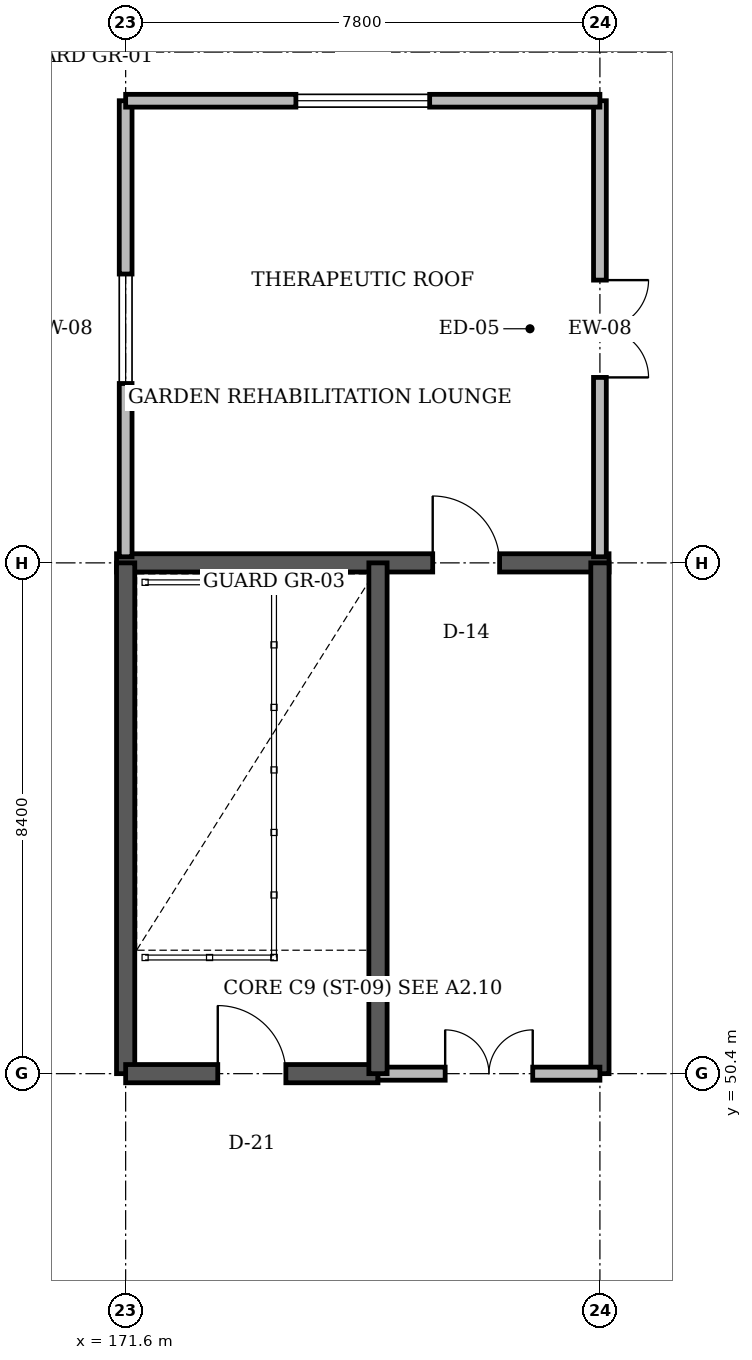
"""IFC4 building model, lengths in metres.
Left out: names, types, materials, properties, quantities, classifications, styles, units other than length and angle.
Written with IfcOpenShell. Run it as: python <this file> out.ifc"""

import sys

from ifc_helpers import new_model, si_unit, direction, frame, frame_2d, origin, place, context, subcontext, project, spatial, rectangle, extrude, element, fill, save


model = new_model("IFC4")
c1 = context("Model", 3, precision=1e-05, world=origin(), true_north=direction((0.0, 1.0)))
c2 = subcontext(c1, "Body", "Model", "MODEL_VIEW")
j1 = project(units=[si_unit("LENGTHUNIT", "METRE"), si_unit("PLANEANGLEUNIT", "RADIAN")], contexts=[c1])
p1 = place(None, origin())
s1 = spatial("IfcSite", under=j1, at=p1, CompositionType="ELEMENT")
p2 = place(p1, origin())
s2 = spatial("IfcBuilding", under=s1, at=p2, CompositionType="ELEMENT")
p3 = place(p2, frame((0.0, 0.0, 18.0)))
s3 = spatial("IfcBuildingStorey", under=s2, at=p3, CompositionType="ELEMENT", Elevation=18.0)
p4 = place(p3, frame((171.45, 58.8, 0.0), z_axis=(0.0, 0.0, 1.0), x_axis=(1.0, 0.0, 0.0)))
e1 = element("IfcWall", 1, at=p4, inside=s3, PredefinedType="SHEAR", context=c2, shape_type="SweptSolid", body=[
    extrude(rectangle(XDim=8.1, YDim=0.3, at=frame_2d((4.05, 0.0))), origin(), (0.0, 0.0, 1.0), 4.2),
])
p5 = place(p4, frame((5.2, 0.0, 0.0)))
e2 = element("IfcOpeningElement", 2, at=p5, cuts=e1, PredefinedType="OPENING", context=c2, shape_type="SweptSolid", body=[
    extrude(rectangle(XDim=1.1, YDim=2.15, at=frame_2d((0.55, 1.075))), frame((0.0, 0.16, 0.0), z_axis=(0.0, -1.0, 0.0), x_axis=(1.0, 0.0, 0.0)), (0.0, 0.0, 1.0), 0.32),
])
for number, where, z_axis, x_axis in (
    (3, (171.6, 50.4, 0.0), (0.0, 0.0, 1.0), (0.0, 1.0, 0.0)),
    (4, (179.4, 50.4, 0.0), (0.0, 0.0, 1.0), (0.0, 1.0, 0.0)),
):
    element("IfcWall", number, at=place(p3, frame(where, z_axis=z_axis, x_axis=x_axis)), inside=s3, PredefinedType="SHEAR", context=c2, shape_type="SweptSolid", body=[
        extrude(rectangle(XDim=8.4, YDim=0.3, at=frame_2d((4.2, 0.0))), origin(), (0.0, 0.0, 1.0), 4.2),
    ])
p6 = place(p3, frame((179.4, 66.4, 0.0), z_axis=(0.0, 0.0, 1.0), x_axis=(0.0, -1.0, 0.0)))
e5 = element("IfcWall", 5, at=p6, inside=s3, PredefinedType="STANDARD", context=c2, shape_type="SweptSolid", body=[
    extrude(rectangle(XDim=7.5, YDim=0.21, at=frame_2d((3.75, 0.0))), origin(), (0.0, 0.0, 1.0), 3.94),
])
p7 = place(p6, frame((2.95, 0.0, 0.0)))
e6 = element("IfcOpeningElement", 6, at=p7, cuts=e5, PredefinedType="OPENING", context=c2, shape_type="SweptSolid", body=[
    extrude(rectangle(XDim=1.6, YDim=2.2, at=frame_2d((0.8, 1.1))), frame((0.0, 0.115, 0.0), z_axis=(0.0, -1.0, 0.0), x_axis=(1.0, 0.0, 0.0)), (0.0, 0.0, 1.0), 0.23),
])
p8 = place(p3, frame((171.6, 58.9, 0.0), z_axis=(0.0, 0.0, 1.0), x_axis=(0.0, 1.0, 0.0)))
e7 = element("IfcWall", 7, at=p8, inside=s3, PredefinedType="STANDARD", context=c2, shape_type="SweptSolid", body=[
    extrude(rectangle(XDim=7.5, YDim=0.21, at=frame_2d((3.75, 0.0))), origin(), (0.0, 0.0, 1.0), 3.94),
])
p9 = place(p8, frame((2.85, 0.0, 0.9)))
e8 = element("IfcOpeningElement", 8, at=p9, cuts=e7, PredefinedType="OPENING", context=c2, shape_type="SweptSolid", body=[
    extrude(rectangle(XDim=1.8, YDim=1.65, at=frame_2d((0.9, 0.825))), frame((0.0, 0.115, 0.0), z_axis=(0.0, -1.0, 0.0), x_axis=(1.0, 0.0, 0.0)), (0.0, 0.0, 1.0), 0.23),
])
p10 = place(p3, frame((171.6, 66.4, 0.0), z_axis=(0.0, 0.0, 1.0), x_axis=(1.0, 0.0, 0.0)))
e9 = element("IfcWall", 9, at=p10, inside=s3, PredefinedType="STANDARD", context=c2, shape_type="SweptSolid", body=[
    extrude(rectangle(XDim=7.8, YDim=0.21, at=frame_2d((3.9, 0.0))), origin(), (0.0, 0.0, 1.0), 3.94),
])
p11 = place(p10, frame((2.8, 0.0, 0.9)))
e10 = element("IfcOpeningElement", 10, at=p11, cuts=e9, PredefinedType="OPENING", context=c2, shape_type="SweptSolid", body=[
    extrude(rectangle(XDim=2.2, YDim=1.65, at=frame_2d((1.1, 0.825))), frame((0.0, 0.115, 0.0), z_axis=(0.0, -1.0, 0.0), x_axis=(1.0, 0.0, 0.0)), (0.0, 0.0, 1.0), 0.23),
])
p12 = place(p3, frame((171.6, 50.4, 0.0), z_axis=(0.0, 0.0, 1.0), x_axis=(1.0, 0.0, 0.0)))
e11 = element("IfcWall", 11, at=p12, inside=s3, PredefinedType="SHEAR", context=c2, shape_type="SweptSolid", body=[
    extrude(rectangle(XDim=4.15, YDim=0.3, at=frame_2d((2.075, 0.0))), origin(), (0.0, 0.0, 1.0), 4.2),
])
p13 = place(p12, frame((1.515, 0.0, 0.0)))
e12 = element("IfcOpeningElement", 12, at=p13, cuts=e11, PredefinedType="OPENING", context=c2, shape_type="SweptSolid", body=[
    extrude(rectangle(XDim=1.12, YDim=2.15, at=frame_2d((0.56, 1.075))), frame((0.0, 0.16, 0.0), z_axis=(0.0, -1.0, 0.0), x_axis=(1.0, 0.0, 0.0)), (0.0, 0.0, 1.0), 0.32),
])
p14 = place(p3, frame((175.75, 50.4, 0.0), z_axis=(0.0, 0.0, 1.0), x_axis=(1.0, 0.0, 0.0)))
e13 = element("IfcWall", 13, at=p14, inside=s3, PredefinedType="STANDARD", context=c2, shape_type="SweptSolid", body=[
    extrude(rectangle(XDim=3.65, YDim=0.215, at=frame_2d((1.825, 0.0))), origin(), (0.0, 0.0, 1.0), 3.22),
])
p15 = place(p14, frame((1.105, 0.0, 0.0)))
e14 = element("IfcOpeningElement", 14, at=p15, cuts=e13, PredefinedType="OPENING", context=c2, shape_type="SweptSolid", body=[
    extrude(rectangle(XDim=1.44, YDim=2.2, at=frame_2d((0.72, 1.1))), frame((0.0, 0.118, 0.0), z_axis=(0.0, -1.0, 0.0), x_axis=(1.0, 0.0, 0.0)), (0.0, 0.0, 1.0), 0.235),
])
p16 = place(p3, frame((175.75, 50.4, 0.0), z_axis=(0.0, 0.0, 1.0), x_axis=(0.0, 1.0, 0.0)))
e15 = element("IfcWall", 15, at=p16, inside=s3, PredefinedType="SHEAR", context=c2, shape_type="SweptSolid", body=[
    extrude(rectangle(XDim=8.4, YDim=0.3, at=frame_2d((4.2, 0.0))), origin(), (0.0, 0.0, 1.0), 4.2),
])
p17 = place(p7, origin())
e16 = element("IfcDoor", 16, at=p17, inside=s3, OperationType="DOUBLE_DOOR_SINGLE_SWING", PredefinedType="DOOR", context=c2, shape_type="SweptSolid", body=[
    extrude(rectangle(XDim=1.6, YDim=2.2, at=frame_2d((0.8, 1.1))), frame((0.0, 0.025, 0.0), z_axis=(0.0, -1.0, 0.0), x_axis=(1.0, 0.0, 0.0)), (0.0, 0.0, 1.0), 0.05),
])
fill(e6, e16)
p18 = place(p9, origin())
e17 = element("IfcWindow", 17, at=p18, inside=s3, PartitioningType="SINGLE_PANEL", PredefinedType="WINDOW", context=c2, shape_type="SweptSolid", body=[
    extrude(rectangle(XDim=1.8, YDim=1.65, at=frame_2d((0.9, 0.825))), frame((0.0, 0.03, 0.0), z_axis=(0.0, -1.0, 0.0), x_axis=(1.0, 0.0, 0.0)), (0.0, 0.0, 1.0), 0.06),
])
fill(e8, e17)
p19 = place(p11, origin())
e18 = element("IfcWindow", 18, at=p19, inside=s3, PartitioningType="SINGLE_PANEL", PredefinedType="WINDOW", context=c2, shape_type="SweptSolid", body=[
    extrude(rectangle(XDim=2.2, YDim=1.65, at=frame_2d((1.1, 0.825))), frame((0.0, 0.03, 0.0), z_axis=(0.0, -1.0, 0.0), x_axis=(1.0, 0.0, 0.0)), (0.0, 0.0, 1.0), 0.06),
])
fill(e10, e18)
p20 = place(p13, origin())
e19 = element("IfcDoor", 19, at=p20, inside=s3, OperationType="SINGLE_SWING_LEFT", PredefinedType="DOOR", context=c2, shape_type="SweptSolid", body=[
    extrude(rectangle(XDim=1.12, YDim=2.15, at=frame_2d((0.56, 1.075))), frame((0.0, 0.025, 0.0), z_axis=(0.0, -1.0, 0.0), x_axis=(1.0, 0.0, 0.0)), (0.0, 0.0, 1.0), 0.05),
])
fill(e12, e19)
p21 = place(p15, origin())
e20 = element("IfcDoor", 20, at=p21, inside=s3, OperationType="DOUBLE_DOOR_SINGLE_SWING", PredefinedType="DOOR", context=c2, shape_type="SweptSolid", body=[
    extrude(rectangle(XDim=1.44, YDim=2.2, at=frame_2d((0.72, 1.1))), frame((0.0, 0.025, 0.0), z_axis=(0.0, -1.0, 0.0), x_axis=(1.0, 0.0, 0.0)), (0.0, 0.0, 1.0), 0.05),
])
fill(e14, e20)
p22 = place(p5, origin())
e21 = element("IfcDoor", 21, at=p22, inside=s3, OperationType="SINGLE_SWING_LEFT", PredefinedType="DOOR", context=c2, shape_type="SweptSolid", body=[
    extrude(rectangle(XDim=1.1, YDim=2.15, at=frame_2d((0.55, 1.075))), frame((0.0, 0.025, 0.0), z_axis=(0.0, -1.0, 0.0), x_axis=(1.0, 0.0, 0.0)), (0.0, 0.0, 1.0), 0.05),
])
fill(e2, e21)
save(model, sys.argv[1])
